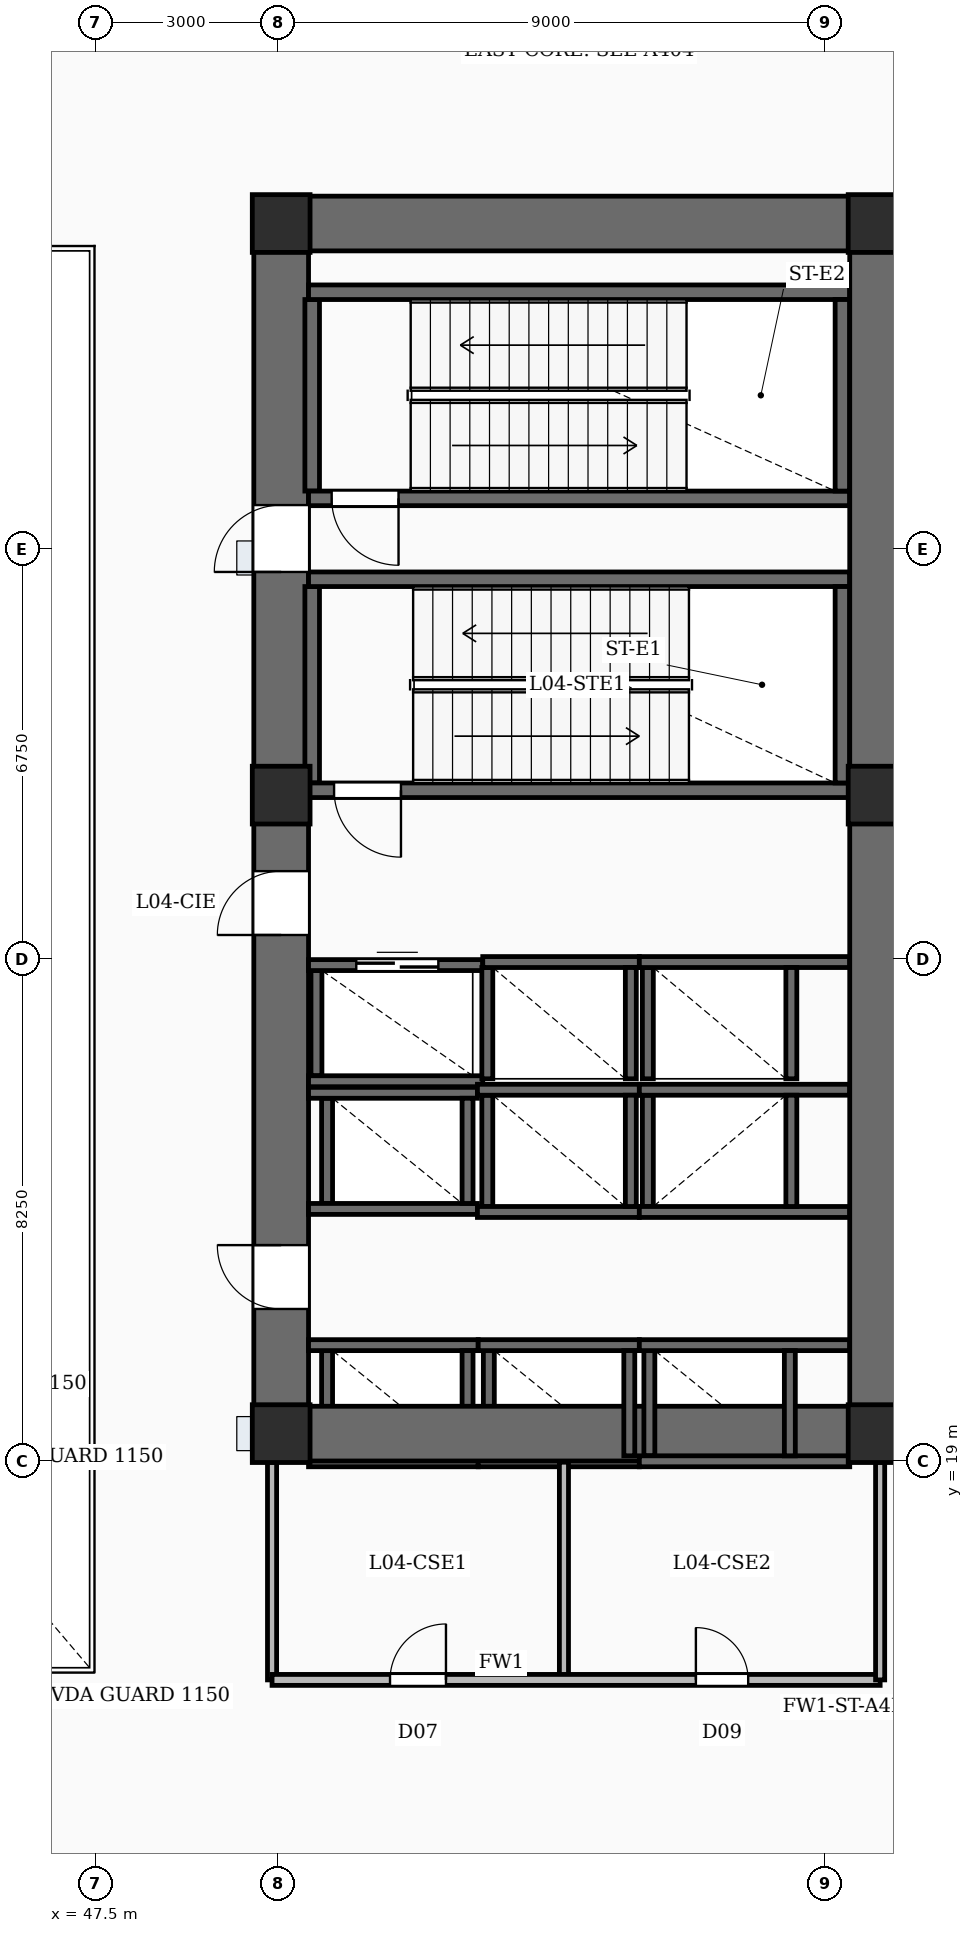
"""IFC4 building model, lengths in metres.
Left out: names, types, materials, properties, quantities, classifications, styles, units other than length and angle.
Written with IfcOpenShell. Run it as: python <this file> out.ifc"""

import sys

from ifc_helpers import new_model, si_unit, direction, frame, frame_2d, origin, origin_2d, place, context, subcontext, project, spatial, rectangle, extrude, element, fill, save


model = new_model("IFC4")
c1 = context("Model", 3, precision=1e-05, world=origin(), true_north=direction((0.0, 1.0)))
c2 = subcontext(c1, "Body", "Model", "MODEL_VIEW")
j1 = project(units=[si_unit("LENGTHUNIT", "METRE"), si_unit("PLANEANGLEUNIT", "RADIAN")], contexts=[c1])
p1 = place(None, origin())
s1 = spatial("IfcSite", under=j1, at=p1, CompositionType="ELEMENT")
p2 = place(p1, origin())
s2 = spatial("IfcBuilding", under=s1, at=p2, CompositionType="ELEMENT")
p3 = place(p2, frame((0.0, 0.0, 23.0)))
s3 = spatial("IfcBuildingStorey", under=s2, at=p3, CompositionType="ELEMENT", Elevation=23.0)
p4 = place(p3, frame((50.55, 19.0, -0.35), z_axis=(0.0, 0.0, 1.0), x_axis=(0.0, 1.0, 0.0)))
e1 = element("IfcWall", 1, at=p4, inside=s3, PredefinedType="SHEAR", context=c2, shape_type="SweptSolid", body=[
    extrude(rectangle(XDim=20.8, YDim=0.9, at=frame_2d((10.4, 0.0))), origin(), (0.0, 0.0, 1.0), 5.0),
])
p5 = place(p4, frame((2.5, 0.0, 0.35)))
e2 = element("IfcOpeningElement", 2, at=p5, cuts=e1, PredefinedType="OPENING", context=c2, shape_type="SweptSolid", body=[
    extrude(rectangle(XDim=1.05, YDim=2.15, at=frame_2d((0.525, 1.075))), frame((0.0, 0.46, 0.0), z_axis=(0.0, -1.0, 0.0), x_axis=(1.0, 0.0, 0.0)), (0.0, 0.0, 1.0), 0.92),
])
p6 = place(p4, frame((8.65, 0.0, 0.35)))
e3 = element("IfcOpeningElement", 3, at=p6, cuts=e1, PredefinedType="OPENING", context=c2, shape_type="SweptSolid", body=[
    extrude(rectangle(XDim=1.05, YDim=2.15, at=frame_2d((0.525, 1.075))), frame((0.0, 0.46, 0.0), z_axis=(0.0, -1.0, 0.0), x_axis=(1.0, 0.0, 0.0)), (0.0, 0.0, 1.0), 0.92),
])
p7 = place(p4, frame((14.62, 0.0, 0.35)))
e4 = element("IfcOpeningElement", 4, at=p7, cuts=e1, PredefinedType="OPENING", context=c2, shape_type="SweptSolid", body=[
    extrude(rectangle(XDim=1.1, YDim=2.15, at=frame_2d((0.55, 1.075))), frame((0.0, 0.46, 0.0), z_axis=(0.0, -1.0, 0.0), x_axis=(1.0, 0.0, 0.0)), (0.0, 0.0, 1.0), 0.92),
])
p8 = place(p3, frame((60.35, 19.0, -0.35), z_axis=(0.0, 0.0, 1.0), x_axis=(0.0, 1.0, 0.0)))
e5 = element("IfcWall", 5, at=p8, inside=s3, PredefinedType="SHEAR", context=c2, shape_type="SweptSolid", body=[
    extrude(rectangle(XDim=20.8, YDim=0.9, at=frame_2d((10.4, 0.0))), origin(), (0.0, 0.0, 1.0), 5.0),
])
for number, where, z_axis, x_axis in (
    (6, (51.0, 19.45, -0.35), (0.0, 0.0, 1.0), (1.0, 0.0, 0.0)),
    (7, (51.0, 39.35, -0.35), (0.0, 0.0, 1.0), (1.0, 0.0, 0.0)),
):
    element("IfcWall", number, at=place(p3, frame(where, z_axis=z_axis, x_axis=x_axis)), inside=s3, PredefinedType="SHEAR", context=c2, shape_type="SweptSolid", body=[
        extrude(rectangle(XDim=8.9, YDim=0.9, at=frame_2d((4.45, 0.0))), origin(), (0.0, 0.0, 1.0), 5.0),
    ])
for number, where, z_axis, x_axis in (
    (8, (50.55, 19.45, -0.35), (0.0, 0.0, 1.0), (1.0, 0.0, 0.0)),
    (9, (60.35, 19.45, -0.35), (0.0, 0.0, 1.0), (1.0, 0.0, 0.0)),
    (10, (50.55, 29.95, -0.35), (0.0, 0.0, 1.0), (1.0, 0.0, 0.0)),
    (11, (60.35, 29.95, -0.35), (0.0, 0.0, 1.0), (1.0, 0.0, 0.0)),
    (12, (50.55, 39.35, -0.35), (0.0, 0.0, 1.0), (1.0, 0.0, 0.0)),
    (13, (60.35, 39.35, -0.35), (0.0, 0.0, 1.0), (1.0, 0.0, 0.0)),
):
    element("IfcColumn", number, at=place(p3, frame(where, z_axis=z_axis, x_axis=x_axis)), inside=s3, PredefinedType="COLUMN", context=c2, shape_type="SweptSolid", body=[
        extrude(rectangle(XDim=0.95, YDim=0.95, at=origin_2d()), origin(), (0.0, 0.0, 1.0), 5.0),
    ])
p9 = place(p3, frame((59.9, 30.03, 0.0), z_axis=(0.0, 0.0, 1.0), x_axis=(-1.0, 0.0, 0.0)))
e14 = element("IfcWall", 14, at=p9, inside=s3, PredefinedType="SOLIDWALL", context=c2, shape_type="SweptSolid", body=[
    extrude(rectangle(XDim=8.9, YDim=0.24, at=frame_2d((4.45, 0.0))), origin(), (0.0, 0.0, 1.0), 4.65),
])
p10 = place(p9, frame((7.38, 0.0, 0.0)))
e15 = element("IfcOpeningElement", 15, at=p10, cuts=e14, PredefinedType="OPENING", context=c2, shape_type="SweptSolid", body=[
    extrude(rectangle(XDim=1.1, YDim=2.15, at=frame_2d((0.55, 1.075))), frame((0.0, 0.13, 0.0), z_axis=(0.0, -1.0, 0.0), x_axis=(1.0, 0.0, 0.0)), (0.0, 0.0, 1.0), 0.26),
])
p11 = place(p3, frame((51.0, 33.5, 0.0), z_axis=(0.0, 0.0, 1.0), x_axis=(1.0, 0.0, 0.0)))
e16 = element("IfcWall", 16, at=p11, inside=s3, PredefinedType="SOLIDWALL", context=c2, shape_type="SweptSolid", body=[
    extrude(rectangle(XDim=8.9, YDim=0.24, at=frame_2d((4.45, 0.0))), origin(), (0.0, 0.0, 1.0), 4.65),
])
for number, where, z_axis, x_axis in (
    (17, (51.06, 30.15, 0.0), (0.0, 0.0, 1.0), (0.0, 1.0, 0.0)),
    (18, (59.78, 30.15, 0.0), (0.0, 0.0, 1.0), (0.0, 1.0, 0.0)),
):
    element("IfcWall", number, at=place(p3, frame(where, z_axis=z_axis, x_axis=x_axis)), inside=s3, PredefinedType="SOLIDWALL", context=c2, shape_type="SweptSolid", body=[
        extrude(rectangle(XDim=3.23, YDim=0.24, at=frame_2d((1.615, 0.0))), origin(), (0.0, 0.0, 1.0), 4.65),
    ])
p12 = place(p3, frame((59.9, 34.83, 0.0), z_axis=(0.0, 0.0, 1.0), x_axis=(-1.0, 0.0, 0.0)))
e19 = element("IfcWall", 19, at=p12, inside=s3, PredefinedType="SOLIDWALL", context=c2, shape_type="SweptSolid", body=[
    extrude(rectangle(XDim=8.9, YDim=0.24, at=frame_2d((4.45, 0.0))), origin(), (0.0, 0.0, 1.0), 4.65),
])
p13 = place(p12, frame((7.42, 0.0, 0.0)))
e20 = element("IfcOpeningElement", 20, at=p13, cuts=e19, PredefinedType="OPENING", context=c2, shape_type="SweptSolid", body=[
    extrude(rectangle(XDim=1.1, YDim=2.15, at=frame_2d((0.55, 1.075))), frame((0.0, 0.13, 0.0), z_axis=(0.0, -1.0, 0.0), x_axis=(1.0, 0.0, 0.0)), (0.0, 0.0, 1.0), 0.26),
])
p14 = place(p3, frame((51.0, 38.22, 0.0), z_axis=(0.0, 0.0, 1.0), x_axis=(1.0, 0.0, 0.0)))
e21 = element("IfcWall", 21, at=p14, inside=s3, PredefinedType="SOLIDWALL", context=c2, shape_type="SweptSolid", body=[
    extrude(rectangle(XDim=8.9, YDim=0.24, at=frame_2d((4.45, 0.0))), origin(), (0.0, 0.0, 1.0), 4.65),
])
for number, where, z_axis, x_axis in (
    (22, (51.06, 34.95, 0.0), (0.0, 0.0, 1.0), (0.0, 1.0, 0.0)),
    (23, (59.78, 34.95, 0.0), (0.0, 0.0, 1.0), (0.0, 1.0, 0.0)),
):
    element("IfcWall", number, at=place(p3, frame(where, z_axis=z_axis, x_axis=x_axis)), inside=s3, PredefinedType="SOLIDWALL", context=c2, shape_type="SweptSolid", body=[
        extrude(rectangle(XDim=3.15, YDim=0.24, at=frame_2d((1.575, 0.0))), origin(), (0.0, 0.0, 1.0), 4.65),
    ])
for number, where, z_axis, x_axis in (
    (24, (51.0, 20.905, 0.0), (0.0, 0.0, 1.0), (1.0, 0.0, 0.0)),
    (25, (51.0, 18.995, 0.0), (0.0, 0.0, 1.0), (1.0, 0.0, 0.0)),
):
    element("IfcWall", number, at=place(p3, frame(where, z_axis=z_axis, x_axis=x_axis)), inside=s3, PredefinedType="SOLIDWALL", context=c2, shape_type="SweptSolid", body=[
        extrude(rectangle(XDim=2.79, YDim=0.18, at=frame_2d((1.395, 0.0))), origin(), (0.0, 0.0, 1.0), 4.65),
    ])
for number, where, z_axis, x_axis in (
    (26, (51.305, 19.085, 0.0), (0.0, 0.0, 1.0), (0.0, 1.0, 0.0)),
    (27, (53.615, 19.085, 0.0), (0.0, 0.0, 1.0), (0.0, 1.0, 0.0)),
):
    element("IfcWall", number, at=place(p3, frame(where, z_axis=z_axis, x_axis=x_axis)), inside=s3, PredefinedType="SOLIDWALL", context=c2, shape_type="SweptSolid", body=[
        extrude(rectangle(XDim=1.73, YDim=0.18, at=frame_2d((0.865, 0.0))), origin(), (0.0, 0.0, 1.0), 4.65),
    ])
for number, where, z_axis, x_axis in (
    (28, (53.79, 20.905, 0.0), (0.0, 0.0, 1.0), (1.0, 0.0, 0.0)),
    (29, (53.79, 18.995, 0.0), (0.0, 0.0, 1.0), (1.0, 0.0, 0.0)),
):
    element("IfcWall", number, at=place(p3, frame(where, z_axis=z_axis, x_axis=x_axis)), inside=s3, PredefinedType="SOLIDWALL", context=c2, shape_type="SweptSolid", body=[
        extrude(rectangle(XDim=2.65, YDim=0.18, at=frame_2d((1.325, 0.0))), origin(), (0.0, 0.0, 1.0), 4.65),
    ])
for number, where, z_axis, x_axis in (
    (30, (53.965, 19.085, 0.0), (0.0, 0.0, 1.0), (0.0, 1.0, 0.0)),
    (31, (56.275, 19.085, 0.0), (0.0, 0.0, 1.0), (0.0, 1.0, 0.0)),
):
    element("IfcWall", number, at=place(p3, frame(where, z_axis=z_axis, x_axis=x_axis)), inside=s3, PredefinedType="SOLIDWALL", context=c2, shape_type="SweptSolid", body=[
        extrude(rectangle(XDim=1.73, YDim=0.18, at=frame_2d((0.865, 0.0))), origin(), (0.0, 0.0, 1.0), 4.65),
    ])
for number, where, z_axis, x_axis in (
    (32, (56.44, 20.905, 0.0), (0.0, 0.0, 1.0), (1.0, 0.0, 0.0)),
    (33, (56.44, 18.995, 0.0), (0.0, 0.0, 1.0), (1.0, 0.0, 0.0)),
):
    element("IfcWall", number, at=place(p3, frame(where, z_axis=z_axis, x_axis=x_axis)), inside=s3, PredefinedType="SOLIDWALL", context=c2, shape_type="SweptSolid", body=[
        extrude(rectangle(XDim=3.46, YDim=0.18, at=frame_2d((1.73, 0.0))), origin(), (0.0, 0.0, 1.0), 4.65),
    ])
for number, where, z_axis, x_axis in (
    (34, (56.605, 19.085, 0.0), (0.0, 0.0, 1.0), (0.0, 1.0, 0.0)),
    (35, (58.915, 19.085, 0.0), (0.0, 0.0, 1.0), (0.0, 1.0, 0.0)),
):
    element("IfcWall", number, at=place(p3, frame(where, z_axis=z_axis, x_axis=x_axis)), inside=s3, PredefinedType="SOLIDWALL", context=c2, shape_type="SweptSolid", body=[
        extrude(rectangle(XDim=1.73, YDim=0.18, at=frame_2d((0.865, 0.0))), origin(), (0.0, 0.0, 1.0), 4.65),
    ])
for number, where, z_axis, x_axis in (
    (36, (51.0, 25.055, 0.0), (0.0, 0.0, 1.0), (1.0, 0.0, 0.0)),
    (37, (51.0, 23.145, 0.0), (0.0, 0.0, 1.0), (1.0, 0.0, 0.0)),
):
    element("IfcWall", number, at=place(p3, frame(where, z_axis=z_axis, x_axis=x_axis)), inside=s3, PredefinedType="SOLIDWALL", context=c2, shape_type="SweptSolid", body=[
        extrude(rectangle(XDim=2.778, YDim=0.18, at=frame_2d((1.389, 0.0))), origin(), (0.0, 0.0, 1.0), 4.65),
    ])
for number, where, z_axis, x_axis in (
    (38, (51.305, 23.235, 0.0), (0.0, 0.0, 1.0), (0.0, 1.0, 0.0)),
    (39, (53.615, 23.235, 0.0), (0.0, 0.0, 1.0), (0.0, 1.0, 0.0)),
):
    element("IfcWall", number, at=place(p3, frame(where, z_axis=z_axis, x_axis=x_axis)), inside=s3, PredefinedType="SOLIDWALL", context=c2, shape_type="SweptSolid", body=[
        extrude(rectangle(XDim=1.73, YDim=0.18, at=frame_2d((0.865, 0.0))), origin(), (0.0, 0.0, 1.0), 4.65),
    ])
for number, where, z_axis, x_axis in (
    (40, (53.778, 25.105, 0.0), (0.0, 0.0, 1.0), (1.0, 0.0, 0.0)),
    (41, (53.778, 23.095, 0.0), (0.0, 0.0, 1.0), (1.0, 0.0, 0.0)),
):
    element("IfcWall", number, at=place(p3, frame(where, z_axis=z_axis, x_axis=x_axis)), inside=s3, PredefinedType="SOLIDWALL", context=c2, shape_type="SweptSolid", body=[
        extrude(rectangle(XDim=2.662, YDim=0.18, at=frame_2d((1.331, 0.0))), origin(), (0.0, 0.0, 1.0), 4.65),
    ])
for number, where, z_axis, x_axis in (
    (42, (53.94, 23.185, 0.0), (0.0, 0.0, 1.0), (0.0, 1.0, 0.0)),
    (43, (56.3, 23.185, 0.0), (0.0, 0.0, 1.0), (0.0, 1.0, 0.0)),
):
    element("IfcWall", number, at=place(p3, frame(where, z_axis=z_axis, x_axis=x_axis)), inside=s3, PredefinedType="SOLIDWALL", context=c2, shape_type="SweptSolid", body=[
        extrude(rectangle(XDim=1.83, YDim=0.18, at=frame_2d((0.915, 0.0))), origin(), (0.0, 0.0, 1.0), 4.65),
    ])
for number, where, z_axis, x_axis in (
    (44, (56.44, 25.105, 0.0), (0.0, 0.0, 1.0), (1.0, 0.0, 0.0)),
    (45, (56.44, 23.095, 0.0), (0.0, 0.0, 1.0), (1.0, 0.0, 0.0)),
):
    element("IfcWall", number, at=place(p3, frame(where, z_axis=z_axis, x_axis=x_axis)), inside=s3, PredefinedType="SOLIDWALL", context=c2, shape_type="SweptSolid", body=[
        extrude(rectangle(XDim=3.46, YDim=0.18, at=frame_2d((1.73, 0.0))), origin(), (0.0, 0.0, 1.0), 4.65),
    ])
for number, where, z_axis, x_axis in (
    (46, (56.58, 23.185, 0.0), (0.0, 0.0, 1.0), (0.0, 1.0, 0.0)),
    (47, (58.94, 23.185, 0.0), (0.0, 0.0, 1.0), (0.0, 1.0, 0.0)),
):
    element("IfcWall", number, at=place(p3, frame(where, z_axis=z_axis, x_axis=x_axis)), inside=s3, PredefinedType="SOLIDWALL", context=c2, shape_type="SweptSolid", body=[
        extrude(rectangle(XDim=1.83, YDim=0.18, at=frame_2d((0.915, 0.0))), origin(), (0.0, 0.0, 1.0), 4.65),
    ])
p15 = place(p3, frame((53.865, 27.205, 0.0), z_axis=(0.0, 0.0, 1.0), x_axis=(1.0, 0.0, 0.0)))
e48 = element("IfcWall", 48, at=p15, inside=s3, PredefinedType="SOLIDWALL", context=c2, shape_type="SweptSolid", body=[
    extrude(rectangle(XDim=2.575, YDim=0.18, at=frame_2d((1.288, 0.0))), origin(), (0.0, 0.0, 1.0), 4.65),
])
for number, where, z_axis, x_axis in (
    (49, (53.94, 25.285, 0.0), (0.0, 0.0, 1.0), (0.0, 1.0, 0.0)),
    (50, (56.3, 25.285, 0.0), (0.0, 0.0, 1.0), (0.0, 1.0, 0.0)),
):
    element("IfcWall", number, at=place(p3, frame(where, z_axis=z_axis, x_axis=x_axis)), inside=s3, PredefinedType="SOLIDWALL", context=c2, shape_type="SweptSolid", body=[
        extrude(rectangle(XDim=1.83, YDim=0.18, at=frame_2d((0.915, 0.0))), origin(), (0.0, 0.0, 1.0), 4.65),
    ])
p16 = place(p3, frame((56.44, 27.205, 0.0), z_axis=(0.0, 0.0, 1.0), x_axis=(1.0, 0.0, 0.0)))
e51 = element("IfcWall", 51, at=p16, inside=s3, PredefinedType="SOLIDWALL", context=c2, shape_type="SweptSolid", body=[
    extrude(rectangle(XDim=3.46, YDim=0.18, at=frame_2d((1.73, 0.0))), origin(), (0.0, 0.0, 1.0), 4.65),
])
for number, where, z_axis, x_axis in (
    (52, (56.58, 25.285, 0.0), (0.0, 0.0, 1.0), (0.0, 1.0, 0.0)),
    (53, (58.94, 25.285, 0.0), (0.0, 0.0, 1.0), (0.0, 1.0, 0.0)),
):
    element("IfcWall", number, at=place(p3, frame(where, z_axis=z_axis, x_axis=x_axis)), inside=s3, PredefinedType="SOLIDWALL", context=c2, shape_type="SweptSolid", body=[
        extrude(rectangle(XDim=1.83, YDim=0.18, at=frame_2d((0.915, 0.0))), origin(), (0.0, 0.0, 1.0), 4.65),
    ])
p17 = place(p3, frame((51.0, 27.155, 0.0), z_axis=(0.0, 0.0, 1.0), x_axis=(1.0, 0.0, 0.0)))
e54 = element("IfcWall", 54, at=p17, inside=s3, PredefinedType="SOLIDWALL", context=c2, shape_type="SweptSolid", body=[
    extrude(rectangle(XDim=2.865, YDim=0.18, at=frame_2d((1.433, 0.0))), origin(), (0.0, 0.0, 1.0), 4.65),
])
p18 = place(p17, frame((0.785, 0.0, 0.0)))
e55 = element("IfcOpeningElement", 55, at=p18, cuts=e54, PredefinedType="OPENING", context=c2, shape_type="SweptSolid", body=[
    extrude(rectangle(XDim=1.35, YDim=2.3, at=frame_2d((0.675, 1.15))), frame((0.0, 0.1, 0.0), z_axis=(0.0, -1.0, 0.0), x_axis=(1.0, 0.0, 0.0)), (0.0, 0.0, 1.0), 0.2),
])
p19 = place(p3, frame((51.0, 25.245, 0.0), z_axis=(0.0, 0.0, 1.0), x_axis=(1.0, 0.0, 0.0)))
e56 = element("IfcWall", 56, at=p19, inside=s3, PredefinedType="SOLIDWALL", context=c2, shape_type="SweptSolid", body=[
    extrude(rectangle(XDim=2.865, YDim=0.18, at=frame_2d((1.433, 0.0))), origin(), (0.0, 0.0, 1.0), 4.65),
])
p20 = place(p3, frame((51.13, 25.335, 0.0), z_axis=(0.0, 0.0, 1.0), x_axis=(0.0, 1.0, 0.0)))
e57 = element("IfcWall", 57, at=p20, inside=s3, PredefinedType="SOLIDWALL", context=c2, shape_type="SweptSolid", body=[
    extrude(rectangle(XDim=1.73, YDim=0.18, at=frame_2d((0.865, 0.0))), origin(), (0.0, 0.0, 1.0), 4.65),
])
p21 = place(p3, frame((55.2, 15.4, 0.0), z_axis=(0.0, 0.0, 1.0), x_axis=(0.0, 1.0, 0.0)))
e58 = element("IfcWall", 58, at=p21, inside=s3, PredefinedType="PARTITIONING", context=c2, shape_type="SweptSolid", body=[
    extrude(rectangle(XDim=3.58, YDim=0.15, at=frame_2d((1.79, 0.0))), origin(), (0.0, 0.0, 1.0), 3.71),
])
p22 = place(p3, frame((50.4, 15.4, 0.0), z_axis=(0.0, 0.0, 1.0), x_axis=(1.0, 0.0, 0.0)))
e59 = element("IfcWall", 59, at=p22, inside=s3, PredefinedType="SOLIDWALL", context=c2, shape_type="SweptSolid", body=[
    extrude(rectangle(XDim=10.0, YDim=0.18, at=frame_2d((5.0, 0.0))), origin(), (0.0, 0.0, 1.0), 3.71),
])
p23 = place(p22, frame((1.94, 0.0, 0.0)))
e60 = element("IfcOpeningElement", 60, at=p23, cuts=e59, PredefinedType="OPENING", context=c2, shape_type="SweptSolid", body=[
    extrude(rectangle(XDim=0.92, YDim=2.1, at=frame_2d((0.46, 1.05))), frame((0.0, 0.1, 0.0), z_axis=(0.0, -1.0, 0.0), x_axis=(1.0, 0.0, 0.0)), (0.0, 0.0, 1.0), 0.2),
])
p24 = place(p22, frame((6.97, 0.0, 0.0)))
e61 = element("IfcOpeningElement", 61, at=p24, cuts=e59, PredefinedType="OPENING", context=c2, shape_type="SweptSolid", body=[
    extrude(rectangle(XDim=0.86, YDim=2.05, at=frame_2d((0.43, 1.025))), frame((0.0, 0.1, 0.0), z_axis=(0.0, -1.0, 0.0), x_axis=(1.0, 0.0, 0.0)), (0.0, 0.0, 1.0), 0.2),
])
for number, where, z_axis, x_axis in (
    (62, (50.4, 15.4, 0.0), (0.0, 0.0, 1.0), (0.0, 1.0, 0.0)),
    (63, (60.4, 15.4, 0.0), (0.0, 0.0, 1.0), (0.0, 1.0, 0.0)),
):
    element("IfcWall", number, at=place(p3, frame(where, z_axis=z_axis, x_axis=x_axis)), inside=s3, PredefinedType="PARTITIONING", context=c2, shape_type="SweptSolid", body=[
        extrude(rectangle(XDim=3.58, YDim=0.15, at=frame_2d((1.79, 0.0))), origin(), (0.0, 0.0, 1.0), 3.71),
    ])
p25 = place(p5, origin())
e64 = element("IfcDoor", 64, at=p25, inside=s3, OperationType="SINGLE_SWING_RIGHT", PredefinedType="DOOR", context=c2, shape_type="SweptSolid", body=[
    extrude(rectangle(XDim=1.05, YDim=2.15, at=frame_2d((0.525, 1.075))), frame((0.0, 0.025, 0.0), z_axis=(0.0, -1.0, 0.0), x_axis=(1.0, 0.0, 0.0)), (0.0, 0.0, 1.0), 0.05),
])
fill(e2, e64)
p26 = place(p6, origin())
e65 = element("IfcDoor", 65, at=p26, inside=s3, OperationType="SINGLE_SWING_LEFT", PredefinedType="DOOR", context=c2, shape_type="SweptSolid", body=[
    extrude(rectangle(XDim=1.05, YDim=2.15, at=frame_2d((0.525, 1.075))), frame((0.0, 0.025, 0.0), z_axis=(0.0, -1.0, 0.0), x_axis=(1.0, 0.0, 0.0)), (0.0, 0.0, 1.0), 0.05),
])
fill(e3, e65)
p27 = place(p7, origin())
e66 = element("IfcDoor", 66, at=p27, inside=s3, OperationType="SINGLE_SWING_LEFT", PredefinedType="DOOR", context=c2, shape_type="SweptSolid", body=[
    extrude(rectangle(XDim=1.1, YDim=2.15, at=frame_2d((0.55, 1.075))), frame((0.0, 0.025, 0.0), z_axis=(0.0, -1.0, 0.0), x_axis=(1.0, 0.0, 0.0)), (0.0, 0.0, 1.0), 0.05),
])
fill(e4, e66)
p28 = place(p10, origin())
e67 = element("IfcDoor", 67, at=p28, inside=s3, OperationType="SINGLE_SWING_LEFT", PredefinedType="DOOR", context=c2, shape_type="SweptSolid", body=[
    extrude(rectangle(XDim=1.1, YDim=2.15, at=frame_2d((0.55, 1.075))), frame((0.0, 0.025, 0.0), z_axis=(0.0, -1.0, 0.0), x_axis=(1.0, 0.0, 0.0)), (0.0, 0.0, 1.0), 0.05),
])
fill(e15, e67)
p29 = place(p13, origin())
e68 = element("IfcDoor", 68, at=p29, inside=s3, OperationType="SINGLE_SWING_LEFT", PredefinedType="DOOR", context=c2, shape_type="SweptSolid", body=[
    extrude(rectangle(XDim=1.1, YDim=2.15, at=frame_2d((0.55, 1.075))), frame((0.0, 0.025, 0.0), z_axis=(0.0, -1.0, 0.0), x_axis=(1.0, 0.0, 0.0)), (0.0, 0.0, 1.0), 0.05),
])
fill(e20, e68)
p30 = place(p18, origin())
e69 = element("IfcDoor", 69, at=p30, inside=s3, OperationType="DOUBLE_DOOR_SLIDING", PredefinedType="DOOR", context=c2, shape_type="SweptSolid", body=[
    extrude(rectangle(XDim=1.35, YDim=2.3, at=frame_2d((0.675, 1.15))), frame((0.0, 0.025, 0.0), z_axis=(0.0, -1.0, 0.0), x_axis=(1.0, 0.0, 0.0)), (0.0, 0.0, 1.0), 0.05),
])
fill(e55, e69)
p31 = place(p23, origin())
e70 = element("IfcDoor", 70, at=p31, inside=s3, OperationType="SINGLE_SWING_RIGHT", PredefinedType="DOOR", context=c2, shape_type="SweptSolid", body=[
    extrude(rectangle(XDim=0.92, YDim=2.1, at=frame_2d((0.46, 1.05))), frame((0.0, 0.025, 0.0), z_axis=(0.0, -1.0, 0.0), x_axis=(1.0, 0.0, 0.0)), (0.0, 0.0, 1.0), 0.05),
])
fill(e60, e70)
p32 = place(p24, origin())
e71 = element("IfcDoor", 71, at=p32, inside=s3, OperationType="SINGLE_SWING_LEFT", PredefinedType="DOOR", context=c2, shape_type="SweptSolid", body=[
    extrude(rectangle(XDim=0.86, YDim=2.05, at=frame_2d((0.43, 1.025))), frame((0.0, 0.025, 0.0), z_axis=(0.0, -1.0, 0.0), x_axis=(1.0, 0.0, 0.0)), (0.0, 0.0, 1.0), 0.05),
])
fill(e61, e71)
save(model, sys.argv[1])
